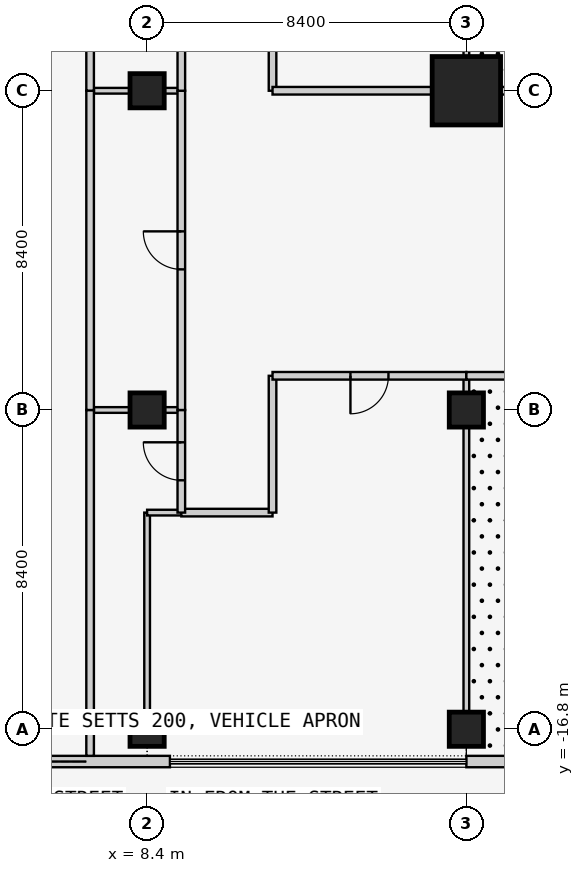
"""IFC4 building model, lengths in metres.
Left out: names, types, materials, properties, quantities, classifications, styles, units other than length and angle.
Written with IfcOpenShell. Run it as: python <this file> out.ifc"""

import sys

from ifc_helpers import new_model, si_unit, direction, frame, frame_2d, origin, origin_2d, place, context, subcontext, project, spatial, rectangle, extrude, element, fill, save


model = new_model("IFC4")
c1 = context("Model", 3, precision=1e-05, world=origin(), true_north=direction((0.0, 1.0)))
c2 = subcontext(c1, "Body", "Model", "MODEL_VIEW")
j1 = project(units=[si_unit("LENGTHUNIT", "METRE"), si_unit("PLANEANGLEUNIT", "RADIAN")], contexts=[c1])
p1 = place(None, origin())
s1 = spatial("IfcSite", under=j1, at=p1, CompositionType="ELEMENT")
p2 = place(p1, origin())
s2 = spatial("IfcBuilding", under=s1, at=p2, CompositionType="ELEMENT")
p3 = place(p2, origin())
s3 = spatial("IfcBuildingStorey", under=s2, at=p3, CompositionType="ELEMENT", Elevation=0.0)
for number, where, z_axis, x_axis in (
    (1, (8.4, -16.8, 0.0), (0.0, 0.0, 1.0), (1.0, 0.0, 0.0)),
    (2, (8.4, -8.4, 0.0), (0.0, 0.0, 1.0), (1.0, 0.0, 0.0)),
    (3, (8.4, 0.0, 0.0), (0.0, 0.0, 1.0), (1.0, 0.0, 0.0)),
    (4, (16.8, -16.8, 0.0), (0.0, 0.0, 1.0), (1.0, 0.0, 0.0)),
    (5, (16.8, -8.4, 0.0), (0.0, 0.0, 1.0), (1.0, 0.0, 0.0)),
):
    element("IfcColumn", number, at=place(p3, frame(where, z_axis=z_axis, x_axis=x_axis)), inside=s3, PredefinedType="COLUMN", context=c2, shape_type="SweptSolid", body=[
        extrude(rectangle(XDim=0.9, YDim=0.9, at=origin_2d()), origin(), (0.0, 0.0, 1.0), 6.0),
    ])
p4 = place(p3, frame((16.8, 0.0, 0.0), z_axis=(0.0, 0.0, 1.0), x_axis=(1.0, 0.0, 0.0)))
e6 = element("IfcColumn", 6, at=p4, inside=s3, PredefinedType="COLUMN", context=c2, shape_type="SweptSolid", body=[
    extrude(rectangle(XDim=1.8, YDim=1.8, at=origin_2d()), origin(), (0.0, 0.0, 1.0), 6.0),
])
p5 = place(p3, frame((0.4, -17.65, 0.0), z_axis=(0.0, 0.0, 1.0), x_axis=(1.0, 0.0, 0.0)))
e7 = element("IfcWall", 7, at=p5, inside=s3, PredefinedType="SOLIDWALL", context=c2, shape_type="SweptSolid", body=[
    extrude(rectangle(XDim=8.6, YDim=0.3, at=frame_2d((4.3, 0.0))), origin(), (0.0, 0.0, 1.0), 5.8),
])
p6 = place(p5, frame((0.2, 0.0, 0.0)))
e8 = element("IfcOpeningElement", 8, at=p6, cuts=e7, PredefinedType="OPENING", context=c2, shape_type="SweptSolid", body=[
    extrude(rectangle(XDim=6.2, YDim=2.7, at=frame_2d((3.1, 1.35))), frame((0.0, 0.16, 0.0), z_axis=(0.0, -1.0, 0.0), x_axis=(1.0, 0.0, 0.0)), (0.0, 0.0, 1.0), 0.32),
])
p7 = place(p3, frame((16.8, -17.65, 0.0), z_axis=(0.0, 0.0, 1.0), x_axis=(1.0, 0.0, 0.0)))
e9 = element("IfcWall", 9, at=p7, inside=s3, PredefinedType="SOLIDWALL", context=c2, shape_type="SweptSolid", body=[
    extrude(rectangle(XDim=17.4, YDim=0.3, at=frame_2d((8.7, 0.0))), origin(), (0.0, 0.0, 1.0), 5.8),
])
p8 = place(p7, frame((1.8, 0.0, 0.0)))
e10 = element("IfcOpeningElement", 10, at=p8, cuts=e9, PredefinedType="OPENING", context=c2, shape_type="SweptSolid", body=[
    extrude(rectangle(XDim=1.8, YDim=2.4, at=frame_2d((0.9, 1.2))), frame((0.0, 0.16, 0.0), z_axis=(0.0, -1.0, 0.0), x_axis=(1.0, 0.0, 0.0)), (0.0, 0.0, 1.0), 0.32),
])
p9 = place(p7, frame((6.0, 0.0, 0.0)))
e11 = element("IfcOpeningElement", 11, at=p9, cuts=e9, PredefinedType="OPENING", context=c2, shape_type="SweptSolid", body=[
    extrude(rectangle(XDim=1.8, YDim=2.4, at=frame_2d((0.9, 1.2))), frame((0.0, 0.16, 0.0), z_axis=(0.0, -1.0, 0.0), x_axis=(1.0, 0.0, 0.0)), (0.0, 0.0, 1.0), 0.32),
])
p10 = place(p7, frame((9.6, 0.0, 0.0)))
e12 = element("IfcOpeningElement", 12, at=p10, cuts=e9, PredefinedType="OPENING", context=c2, shape_type="SweptSolid", body=[
    extrude(rectangle(XDim=1.8, YDim=2.4, at=frame_2d((0.9, 1.2))), frame((0.0, 0.16, 0.0), z_axis=(0.0, -1.0, 0.0), x_axis=(1.0, 0.0, 0.0)), (0.0, 0.0, 1.0), 0.32),
])
p11 = place(p7, frame((13.8, 0.0, 0.0)))
e13 = element("IfcOpeningElement", 13, at=p11, cuts=e9, PredefinedType="OPENING", context=c2, shape_type="SweptSolid", body=[
    extrude(rectangle(XDim=1.8, YDim=2.4, at=frame_2d((0.9, 1.2))), frame((0.0, 0.16, 0.0), z_axis=(0.0, -1.0, 0.0), x_axis=(1.0, 0.0, 0.0)), (0.0, 0.0, 1.0), 0.32),
])
p12 = place(p3, frame((8.4, -16.35, 0.0), z_axis=(0.0, 0.0, 1.0), x_axis=(0.0, 1.0, 0.0)))
e14 = element("IfcWall", 14, at=p12, inside=s3, PredefinedType="PARTITIONING", context=c2, shape_type="SweptSolid", body=[
    extrude(rectangle(XDim=5.25, YDim=0.15, at=frame_2d((2.625, 0.0))), origin(), (0.0, 0.0, 1.0), 5.043),
])
p13 = place(p3, frame((8.4, -11.1, 0.0), z_axis=(0.0, 0.0, 1.0), x_axis=(1.0, 0.0, 0.0)))
e15 = element("IfcWall", 15, at=p13, inside=s3, PredefinedType="PARTITIONING", context=c2, shape_type="SweptSolid", body=[
    extrude(rectangle(XDim=0.9, YDim=0.15, at=frame_2d((0.45, 0.0))), origin(), (0.0, 0.0, 1.0), 5.8),
])
p14 = place(p3, frame((16.8, -8.85, 0.0), z_axis=(0.0, 0.0, 1.0), x_axis=(0.0, -1.0, 0.0)))
e16 = element("IfcWall", 16, at=p14, inside=s3, PredefinedType="PARTITIONING", context=c2, shape_type="SweptSolid", body=[
    extrude(rectangle(XDim=7.5, YDim=0.15, at=frame_2d((3.75, 0.0))), origin(), (0.0, 0.0, 1.0), 5.043),
])
p15 = place(p3, frame((16.8, -7.5, 0.0), z_axis=(0.0, 0.0, 1.0), x_axis=(0.0, -1.0, 0.0)))
e17 = element("IfcWall", 17, at=p15, inside=s3, PredefinedType="PARTITIONING", context=c2, shape_type="SweptSolid", body=[
    extrude(rectangle(XDim=0.45, YDim=0.15, at=frame_2d((0.225, 0.0))), origin(), (0.0, 0.0, 1.0), 5.043),
])
p16 = place(p3, frame((9.3, -11.1, 0.0), z_axis=(0.0, 0.0, 1.0), x_axis=(1.0, 0.0, 0.0)))
e18 = element("IfcWall", 18, at=p16, inside=s3, PredefinedType="PARTITIONING", context=c2, shape_type="SweptSolid", body=[
    extrude(rectangle(XDim=2.4, YDim=0.2, at=frame_2d((1.2, 0.0))), origin(), (0.0, 0.0, 1.0), 5.8),
])
p17 = place(p3, frame((11.7, -11.1, 0.0), z_axis=(0.0, 0.0, 1.0), x_axis=(0.0, 1.0, 0.0)))
e19 = element("IfcWall", 19, at=p17, inside=s3, PredefinedType="PARTITIONING", context=c2, shape_type="SweptSolid", body=[
    extrude(rectangle(XDim=3.6, YDim=0.2, at=frame_2d((1.8, 0.0))), origin(), (0.0, 0.0, 1.0), 5.8),
])
p18 = place(p3, frame((11.7, -7.5, 0.0), z_axis=(0.0, 0.0, 1.0), x_axis=(1.0, 0.0, 0.0)))
e20 = element("IfcWall", 20, at=p18, inside=s3, PredefinedType="PARTITIONING", context=c2, shape_type="SweptSolid", body=[
    extrude(rectangle(XDim=5.1, YDim=0.2, at=frame_2d((2.55, 0.0))), origin(), (0.0, 0.0, 1.0), 5.8),
])
p19 = place(p18, frame((2.05, 0.0, 0.0)))
e21 = element("IfcOpeningElement", 21, at=p19, cuts=e20, PredefinedType="OPENING", context=c2, shape_type="SweptSolid", body=[
    extrude(rectangle(XDim=1.0, YDim=2.1, at=frame_2d((0.5, 1.05))), frame((0.0, 0.11, 0.0), z_axis=(0.0, -1.0, 0.0), x_axis=(1.0, 0.0, 0.0)), (0.0, 0.0, 1.0), 0.22),
])
p20 = place(p3, frame((7.0, -8.4, 0.0), z_axis=(0.0, 0.0, 1.0), x_axis=(1.0, 0.0, 0.0)))
e22 = element("IfcWall", 22, at=p20, inside=s3, PredefinedType="PARTITIONING", context=c2, shape_type="SweptSolid", body=[
    extrude(rectangle(XDim=0.95, YDim=0.15, at=frame_2d((0.475, 0.0))), origin(), (0.0, 0.0, 1.0), 5.043),
])
p21 = place(p3, frame((8.85, -8.4, 0.0), z_axis=(0.0, 0.0, 1.0), x_axis=(1.0, 0.0, 0.0)))
e23 = element("IfcWall", 23, at=p21, inside=s3, PredefinedType="PARTITIONING", context=c2, shape_type="SweptSolid", body=[
    extrude(rectangle(XDim=0.45, YDim=0.15, at=frame_2d((0.225, 0.0))), origin(), (0.0, 0.0, 1.0), 5.043),
])
p22 = place(p3, frame((6.9, -17.5, 0.0), z_axis=(0.0, 0.0, 1.0), x_axis=(0.0, 1.0, 0.0)))
e24 = element("IfcWall", 24, at=p22, inside=s3, PredefinedType="PARTITIONING", context=c2, shape_type="SweptSolid", body=[
    extrude(rectangle(XDim=9.1, YDim=0.2, at=frame_2d((4.55, 0.0))), origin(), (0.0, 0.0, 1.0), 5.8),
])
p23 = place(p3, frame((9.3, -8.4, 0.0), z_axis=(0.0, 0.0, 1.0), x_axis=(0.0, -1.0, 0.0)))
e25 = element("IfcWall", 25, at=p23, inside=s3, PredefinedType="PARTITIONING", context=c2, shape_type="SweptSolid", body=[
    extrude(rectangle(XDim=2.7, YDim=0.2, at=frame_2d((1.35, 0.0))), origin(), (0.0, 0.0, 1.0), 5.8),
])
p24 = place(p23, frame((0.85, 0.0, 0.0)))
e26 = element("IfcOpeningElement", 26, at=p24, cuts=e25, PredefinedType="OPENING", context=c2, shape_type="SweptSolid", body=[
    extrude(rectangle(XDim=1.0, YDim=2.1, at=frame_2d((0.5, 1.05))), frame((0.0, 0.11, 0.0), z_axis=(0.0, -1.0, 0.0), x_axis=(1.0, 0.0, 0.0)), (0.0, 0.0, 1.0), 0.22),
])
p25 = place(p3, frame((16.8, -7.5, 0.0), z_axis=(0.0, 0.0, 1.0), x_axis=(1.0, 0.0, 0.0)))
e27 = element("IfcWall", 27, at=p25, inside=s3, PredefinedType="PARTITIONING", context=c2, shape_type="SweptSolid", body=[
    extrude(rectangle(XDim=7.95, YDim=0.2, at=frame_2d((3.975, 0.0))), origin(), (0.0, 0.0, 1.0), 5.8),
])
p26 = place(p3, frame((7.0, 0.0, 0.0), z_axis=(0.0, 0.0, 1.0), x_axis=(1.0, 0.0, 0.0)))
e28 = element("IfcWall", 28, at=p26, inside=s3, PredefinedType="PARTITIONING", context=c2, shape_type="SweptSolid", body=[
    extrude(rectangle(XDim=0.95, YDim=0.15, at=frame_2d((0.475, 0.0))), origin(), (0.0, 0.0, 1.0), 5.043),
])
p27 = place(p3, frame((8.85, 0.0, 0.0), z_axis=(0.0, 0.0, 1.0), x_axis=(1.0, 0.0, 0.0)))
e29 = element("IfcWall", 29, at=p27, inside=s3, PredefinedType="PARTITIONING", context=c2, shape_type="SweptSolid", body=[
    extrude(rectangle(XDim=0.45, YDim=0.15, at=frame_2d((0.225, 0.0))), origin(), (0.0, 0.0, 1.0), 5.043),
])
p28 = place(p3, frame((6.9, -8.4, 0.0), z_axis=(0.0, 0.0, 1.0), x_axis=(0.0, 1.0, 0.0)))
e30 = element("IfcWall", 30, at=p28, inside=s3, PredefinedType="PARTITIONING", context=c2, shape_type="SweptSolid", body=[
    extrude(rectangle(XDim=8.4, YDim=0.2, at=frame_2d((4.2, 0.0))), origin(), (0.0, 0.0, 1.0), 5.8),
])
p29 = place(p3, frame((9.3, 0.0, 0.0), z_axis=(0.0, 0.0, 1.0), x_axis=(0.0, -1.0, 0.0)))
e31 = element("IfcWall", 31, at=p29, inside=s3, PredefinedType="PARTITIONING", context=c2, shape_type="SweptSolid", body=[
    extrude(rectangle(XDim=8.4, YDim=0.2, at=frame_2d((4.2, 0.0))), origin(), (0.0, 0.0, 1.0), 5.8),
])
p30 = place(p29, frame((3.7, 0.0, 0.0)))
e32 = element("IfcOpeningElement", 32, at=p30, cuts=e31, PredefinedType="OPENING", context=c2, shape_type="SweptSolid", body=[
    extrude(rectangle(XDim=1.0, YDim=2.1, at=frame_2d((0.5, 1.05))), frame((0.0, 0.11, 0.0), z_axis=(0.0, -1.0, 0.0), x_axis=(1.0, 0.0, 0.0)), (0.0, 0.0, 1.0), 0.22),
])
p31 = place(p3, frame((6.9, 0.0, 0.0), z_axis=(0.0, 0.0, 1.0), x_axis=(0.0, 1.0, 0.0)))
e33 = element("IfcWall", 33, at=p31, inside=s3, PredefinedType="PARTITIONING", context=c2, shape_type="SweptSolid", body=[
    extrude(rectangle(XDim=8.4, YDim=0.2, at=frame_2d((4.2, 0.0))), origin(), (0.0, 0.0, 1.0), 5.8),
])
p32 = place(p3, frame((9.3, 8.4, 0.0), z_axis=(0.0, 0.0, 1.0), x_axis=(0.0, -1.0, 0.0)))
e34 = element("IfcWall", 34, at=p32, inside=s3, PredefinedType="PARTITIONING", context=c2, shape_type="SweptSolid", body=[
    extrude(rectangle(XDim=8.4, YDim=0.2, at=frame_2d((4.2, 0.0))), origin(), (0.0, 0.0, 1.0), 5.8),
])
p33 = place(p32, frame((3.7, 0.0, 0.0)))
e35 = element("IfcOpeningElement", 35, at=p33, cuts=e34, PredefinedType="OPENING", context=c2, shape_type="SweptSolid", body=[
    extrude(rectangle(XDim=1.0, YDim=2.1, at=frame_2d((0.5, 1.05))), frame((0.0, 0.11, 0.0), z_axis=(0.0, -1.0, 0.0), x_axis=(1.0, 0.0, 0.0)), (0.0, 0.0, 1.0), 0.22),
])
p34 = place(p3, frame((11.7, 8.4, 0.0), z_axis=(0.0, 0.0, 1.0), x_axis=(0.0, -1.0, 0.0)))
e36 = element("IfcWall", 36, at=p34, inside=s3, PredefinedType="PARTITIONING", context=c2, shape_type="SweptSolid", body=[
    extrude(rectangle(XDim=8.4, YDim=0.2, at=frame_2d((4.2, 0.0))), origin(), (0.0, 0.0, 1.0), 5.8),
])
p35 = place(p34, frame((3.7, 0.0, 0.0)))
e37 = element("IfcOpeningElement", 37, at=p35, cuts=e36, PredefinedType="OPENING", context=c2, shape_type="SweptSolid", body=[
    extrude(rectangle(XDim=1.0, YDim=2.1, at=frame_2d((0.5, 1.05))), frame((0.0, 0.11, 0.0), z_axis=(0.0, -1.0, 0.0), x_axis=(1.0, 0.0, 0.0)), (0.0, 0.0, 1.0), 0.22),
])
p36 = place(p3, frame((11.7, 0.0, 0.0), z_axis=(0.0, 0.0, 1.0), x_axis=(1.0, 0.0, 0.0)))
e38 = element("IfcWall", 38, at=p36, inside=s3, PredefinedType="PARTITIONING", context=c2, shape_type="SweptSolid", body=[
    extrude(rectangle(XDim=4.2, YDim=0.2, at=frame_2d((2.1, 0.0))), origin(), (0.0, 0.0, 1.0), 5.043),
])
p37 = place(p3, frame((17.7, 0.0, 0.0), z_axis=(0.0, 0.0, 1.0), x_axis=(1.0, 0.0, 0.0)))
e39 = element("IfcWall", 39, at=p37, inside=s3, PredefinedType="PARTITIONING", context=c2, shape_type="SweptSolid", body=[
    extrude(rectangle(XDim=6.6, YDim=0.2, at=frame_2d((3.3, 0.0))), origin(), (0.0, 0.0, 1.0), 5.043),
])
p38 = place(p37, frame((0.3, 0.0, 0.0)))
e40 = element("IfcOpeningElement", 40, at=p38, cuts=e39, PredefinedType="OPENING", context=c2, shape_type="SweptSolid", body=[
    extrude(rectangle(XDim=1.8, YDim=2.4, at=frame_2d((0.9, 1.2))), frame((0.0, 0.11, 0.0), z_axis=(0.0, -1.0, 0.0), x_axis=(1.0, 0.0, 0.0)), (0.0, 0.0, 1.0), 0.22),
])
p39 = place(p3, frame((16.8, 7.5, 0.0), z_axis=(0.0, 0.0, 1.0), x_axis=(0.0, -1.0, 0.0)))
e41 = element("IfcWall", 41, at=p39, inside=s3, PredefinedType="PARTITIONING", context=c2, shape_type="SweptSolid", body=[
    extrude(rectangle(XDim=6.6, YDim=0.15, at=frame_2d((3.3, 0.0))), origin(), (0.0, 0.0, 1.0), 5.043),
])
p40 = place(p6, origin())
e42 = element("IfcDoor", 42, at=p40, inside=s3, OperationType="ROLLINGUP", PredefinedType="GATE", context=c2, shape_type="SweptSolid", body=[
    extrude(rectangle(XDim=6.2, YDim=2.7, at=frame_2d((3.1, 1.35))), frame((0.0, 0.025, 0.0), z_axis=(0.0, -1.0, 0.0), x_axis=(1.0, 0.0, 0.0)), (0.0, 0.0, 1.0), 0.05),
])
fill(e8, e42)
p41 = place(p19, frame((1.0, 0.0, 0.0), z_axis=(0.0, 0.0, 1.0), x_axis=(-1.0, 0.0, 0.0)))
e43 = element("IfcDoor", 43, at=p41, inside=s3, OperationType="SINGLE_SWING_RIGHT", PredefinedType="DOOR", context=c2, shape_type="SweptSolid", body=[
    extrude(rectangle(XDim=1.0, YDim=2.1, at=frame_2d((0.5, 1.05))), frame((0.0, 0.025, 0.0), z_axis=(0.0, -1.0, 0.0), x_axis=(1.0, 0.0, 0.0)), (0.0, 0.0, 1.0), 0.05),
])
fill(e21, e43)
p42 = place(p24, frame((1.0, 0.0, 0.0), z_axis=(0.0, 0.0, 1.0), x_axis=(-1.0, 0.0, 0.0)))
e44 = element("IfcDoor", 44, at=p42, inside=s3, OperationType="SINGLE_SWING_RIGHT", PredefinedType="DOOR", context=c2, shape_type="SweptSolid", body=[
    extrude(rectangle(XDim=1.0, YDim=2.1, at=frame_2d((0.5, 1.05))), frame((0.0, 0.025, 0.0), z_axis=(0.0, -1.0, 0.0), x_axis=(1.0, 0.0, 0.0)), (0.0, 0.0, 1.0), 0.05),
])
fill(e26, e44)
p43 = place(p30, frame((1.0, 0.0, 0.0), z_axis=(0.0, 0.0, 1.0), x_axis=(-1.0, 0.0, 0.0)))
e45 = element("IfcDoor", 45, at=p43, inside=s3, OperationType="SINGLE_SWING_RIGHT", PredefinedType="DOOR", context=c2, shape_type="SweptSolid", body=[
    extrude(rectangle(XDim=1.0, YDim=2.1, at=frame_2d((0.5, 1.05))), frame((0.0, 0.025, 0.0), z_axis=(0.0, -1.0, 0.0), x_axis=(1.0, 0.0, 0.0)), (0.0, 0.0, 1.0), 0.05),
])
fill(e32, e45)
save(model, sys.argv[1])
